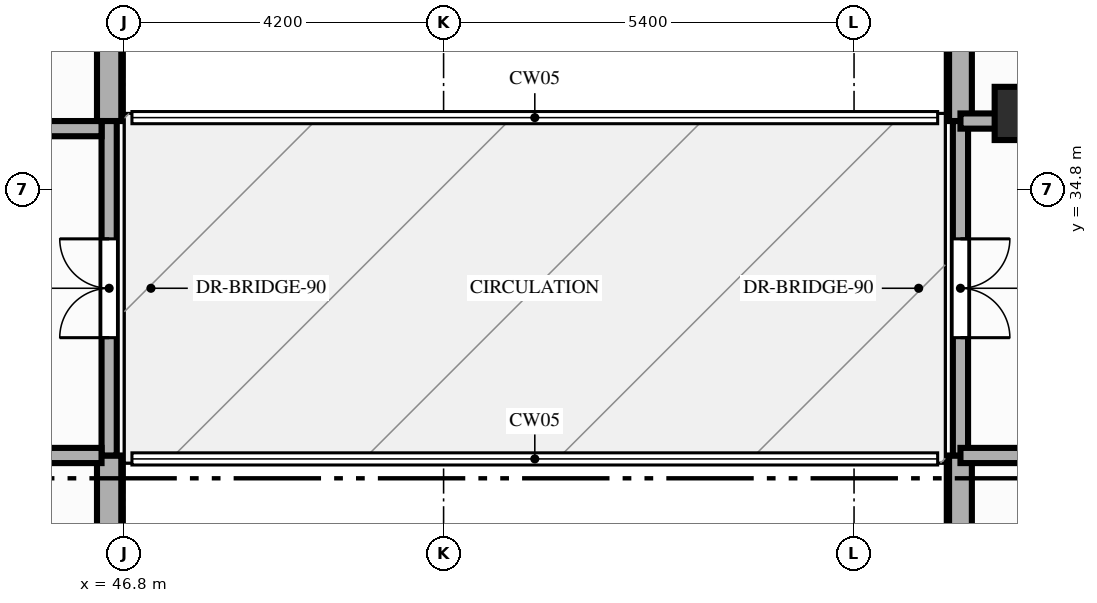
"""IFC4 building model, lengths in metres.
Left out: names, types, materials, properties, quantities, classifications, styles, units other than length and angle.
Written with IfcOpenShell. Run it as: python <this file> out.ifc"""

import sys

from ifc_helpers import new_model, si_unit, direction, frame, frame_2d, origin, origin_2d, place, context, subcontext, project, spatial, rectangle, extrude, element, fill, save


model = new_model("IFC4")
c1 = context("Model", 3, precision=1e-05, world=origin(), true_north=direction((0.0, 1.0)))
c2 = subcontext(c1, "Body", "Model", "MODEL_VIEW")
j1 = project(units=[si_unit("LENGTHUNIT", "METRE"), si_unit("PLANEANGLEUNIT", "RADIAN")], contexts=[c1])
p1 = place(None, origin())
s1 = spatial("IfcSite", under=j1, at=p1, CompositionType="ELEMENT")
p2 = place(p1, origin())
s2 = spatial("IfcBuilding", under=s1, at=p2, CompositionType="ELEMENT")
p3 = place(p2, frame((0.0, 0.0, 102.6)))
s3 = spatial("IfcBuildingStorey", under=s2, at=p3, CompositionType="ELEMENT", Elevation=102.6)
p4 = place(p3, frame((58.6, 35.8, 0.0), z_axis=(0.0, 0.0, 1.0), x_axis=(1.0, 0.0, 0.0)))
e1 = element("IfcColumn", 1, at=p4, inside=s3, PredefinedType="COLUMN", context=c2, shape_type="SweptSolid", body=[
    extrude(rectangle(XDim=0.7, YDim=0.7, at=origin_2d()), origin(), (0.0, 0.0, 1.0), 4.8),
])
p5 = place(p3, frame((46.6, 26.8, 0.0), z_axis=(0.0, 0.0, 1.0), x_axis=(0.0, 1.0, 0.0)))
e2 = element("IfcWall", 2, at=p5, inside=s3, PredefinedType="STANDARD", context=c2, shape_type="SweptSolid", body=[
    extrude(rectangle(XDim=4.5, YDim=0.32, at=frame_2d((2.25, 0.0))), origin(), (0.0, 0.0, 1.0), 4.56),
])
p6 = place(p3, frame((46.6, 35.7, 0.0), z_axis=(0.0, 0.0, 1.0), x_axis=(0.0, 1.0, 0.0)))
e3 = element("IfcWall", 3, at=p6, inside=s3, PredefinedType="STANDARD", context=c2, shape_type="SweptSolid", body=[
    extrude(rectangle(XDim=6.45, YDim=0.32, at=frame_2d((3.225, 0.0))), origin(), (0.0, 0.0, 1.0), 4.56),
])
p7 = place(p3, frame((57.8, 31.3, 0.0), z_axis=(0.0, 0.0, 1.0), x_axis=(0.0, -1.0, 0.0)))
e4 = element("IfcWall", 4, at=p7, inside=s3, PredefinedType="STANDARD", context=c2, shape_type="SweptSolid", body=[
    extrude(rectangle(XDim=10.5, YDim=0.3, at=frame_2d((5.25, 0.0))), origin(), (0.0, 0.0, 1.0), 4.58),
])
p8 = place(p3, frame((57.8, 43.4, 0.0), z_axis=(0.0, 0.0, 1.0), x_axis=(0.0, -1.0, 0.0)))
e5 = element("IfcWall", 5, at=p8, inside=s3, PredefinedType="STANDARD", context=c2, shape_type="SweptSolid", body=[
    extrude(rectangle(XDim=7.7, YDim=0.3, at=frame_2d((3.85, 0.0))), origin(), (0.0, 0.0, 1.0), 4.58),
])
p9 = place(p3, frame((46.6, 31.3, 0.0), z_axis=(0.0, 0.0, 1.0), x_axis=(0.0, 1.0, 0.0)))
e6 = element("IfcWall", 6, at=p9, inside=s3, PredefinedType="PARTITIONING", context=c2, shape_type="SweptSolid", body=[
    extrude(rectangle(XDim=4.4, YDim=0.2, at=frame_2d((2.2, 0.0))), origin(), (0.0, 0.0, 1.0), 4.56),
])
p10 = place(p9, frame((1.55, 0.0, 0.0)))
e7 = element("IfcOpeningElement", 7, at=p10, cuts=e6, PredefinedType="OPENING", context=c2, shape_type="SweptSolid", body=[
    extrude(rectangle(XDim=1.3, YDim=2.3, at=frame_2d((0.65, 1.15))), frame((0.0, 0.11, 0.0), z_axis=(0.0, -1.0, 0.0), x_axis=(1.0, 0.0, 0.0)), (0.0, 0.0, 1.0), 0.22),
])
p11 = place(p3, frame((57.8, 31.3, 0.0), z_axis=(0.0, 0.0, 1.0), x_axis=(0.0, 1.0, 0.0)))
e8 = element("IfcWall", 8, at=p11, inside=s3, PredefinedType="PARTITIONING", context=c2, shape_type="SweptSolid", body=[
    extrude(rectangle(XDim=4.4, YDim=0.2, at=frame_2d((2.2, 0.0))), origin(), (0.0, 0.0, 1.0), 4.56),
])
p12 = place(p11, frame((1.55, 0.0, 0.0)))
e9 = element("IfcOpeningElement", 9, at=p12, cuts=e8, PredefinedType="OPENING", context=c2, shape_type="SweptSolid", body=[
    extrude(rectangle(XDim=1.3, YDim=2.3, at=frame_2d((0.65, 1.15))), frame((0.0, 0.11, 0.0), z_axis=(0.0, -1.0, 0.0), x_axis=(1.0, 0.0, 0.0)), (0.0, 0.0, 1.0), 0.22),
])
p13 = place(p3, frame((27.15, 31.3, 0.0), z_axis=(0.0, 0.0, 1.0), x_axis=(1.0, 0.0, 0.0)))
e10 = element("IfcWall", 10, at=p13, inside=s3, PredefinedType="PARTITIONING", context=c2, shape_type="SweptSolid", body=[
    extrude(rectangle(XDim=19.35, YDim=0.2, at=frame_2d((9.675, 0.0))), origin(), (0.0, 0.0, 1.0), 3.95),
])
p14 = place(p13, frame((3.8, 0.0, 0.0)))
e11 = element("IfcOpeningElement", 11, at=p14, cuts=e10, PredefinedType="OPENING", context=c2, shape_type="SweptSolid", body=[
    extrude(rectangle(XDim=1.5, YDim=2.18, at=frame_2d((0.75, 1.09))), frame((0.0, 0.11, 0.0), z_axis=(0.0, -1.0, 0.0), x_axis=(1.0, 0.0, 0.0)), (0.0, 0.0, 1.0), 0.22),
])
p15 = place(p13, frame((12.6, 0.0, 0.0)))
e12 = element("IfcOpeningElement", 12, at=p15, cuts=e10, PredefinedType="OPENING", context=c2, shape_type="SweptSolid", body=[
    extrude(rectangle(XDim=1.0, YDim=2.15, at=frame_2d((0.5, 1.075))), frame((0.0, 0.11, 0.0), z_axis=(0.0, -1.0, 0.0), x_axis=(1.0, 0.0, 0.0)), (0.0, 0.0, 1.0), 0.22),
])
p16 = place(p3, frame((27.15, 35.6, 0.0), z_axis=(0.0, 0.0, 1.0), x_axis=(1.0, 0.0, 0.0)))
e13 = element("IfcWall", 13, at=p16, inside=s3, PredefinedType="PARTITIONING", context=c2, shape_type="SweptSolid", body=[
    extrude(rectangle(XDim=19.35, YDim=0.2, at=frame_2d((9.675, 0.0))), origin(), (0.0, 0.0, 1.0), 3.95),
])
p17 = place(p16, frame((6.0, 0.0, 0.0)))
e14 = element("IfcOpeningElement", 14, at=p17, cuts=e13, PredefinedType="OPENING", context=c2, shape_type="SweptSolid", body=[
    extrude(rectangle(XDim=1.0, YDim=2.15, at=frame_2d((0.5, 1.075))), frame((0.0, 0.11, 0.0), z_axis=(0.0, -1.0, 0.0), x_axis=(1.0, 0.0, 0.0)), (0.0, 0.0, 1.0), 0.22),
])
p18 = place(p3, frame((57.8, 31.3, 0.0), z_axis=(0.0, 0.0, 1.0), x_axis=(1.0, 0.0, 0.0)))
e15 = element("IfcWall", 15, at=p18, inside=s3, PredefinedType="PARTITIONING", context=c2, shape_type="SweptSolid", body=[
    extrude(rectangle(XDim=5.25, YDim=0.2, at=frame_2d((2.625, 0.0))), origin(), (0.0, 0.0, 1.0), 4.17),
])
p19 = place(p18, frame((2.1, 0.0, 0.0)))
e16 = element("IfcOpeningElement", 16, at=p19, cuts=e15, PredefinedType="OPENING", context=c2, shape_type="SweptSolid", body=[
    extrude(rectangle(XDim=0.95, YDim=2.15, at=frame_2d((0.475, 1.075))), frame((0.0, 0.11, 0.0), z_axis=(0.0, -1.0, 0.0), x_axis=(1.0, 0.0, 0.0)), (0.0, 0.0, 1.0), 0.22),
])
p20 = place(p3, frame((57.8, 35.7, 0.0), z_axis=(0.0, 0.0, 1.0), x_axis=(1.0, 0.0, 0.0)))
e17 = element("IfcWall", 17, at=p20, inside=s3, PredefinedType="PARTITIONING", context=c2, shape_type="SweptSolid", body=[
    extrude(rectangle(XDim=5.25, YDim=0.2, at=frame_2d((2.625, 0.0))), origin(), (0.0, 0.0, 1.0), 4.17),
])
p21 = place(p10, origin())
e18 = element("IfcDoor", 18, at=p21, inside=s3, OperationType="DOUBLE_SWING_LEFT", PredefinedType="DOOR", context=c2, shape_type="SweptSolid", body=[
    extrude(rectangle(XDim=1.3, YDim=2.3, at=frame_2d((0.65, 1.15))), frame((0.0, 0.025, 0.0), z_axis=(0.0, -1.0, 0.0), x_axis=(1.0, 0.0, 0.0)), (0.0, 0.0, 1.0), 0.05),
])
fill(e7, e18)
p22 = place(p12, origin())
e19 = element("IfcDoor", 19, at=p22, inside=s3, OperationType="DOUBLE_SWING_RIGHT", PredefinedType="DOOR", context=c2, shape_type="SweptSolid", body=[
    extrude(rectangle(XDim=1.3, YDim=2.3, at=frame_2d((0.65, 1.15))), frame((0.0, 0.025, 0.0), z_axis=(0.0, -1.0, 0.0), x_axis=(1.0, 0.0, 0.0)), (0.0, 0.0, 1.0), 0.05),
])
fill(e9, e19)
save(model, sys.argv[1])
